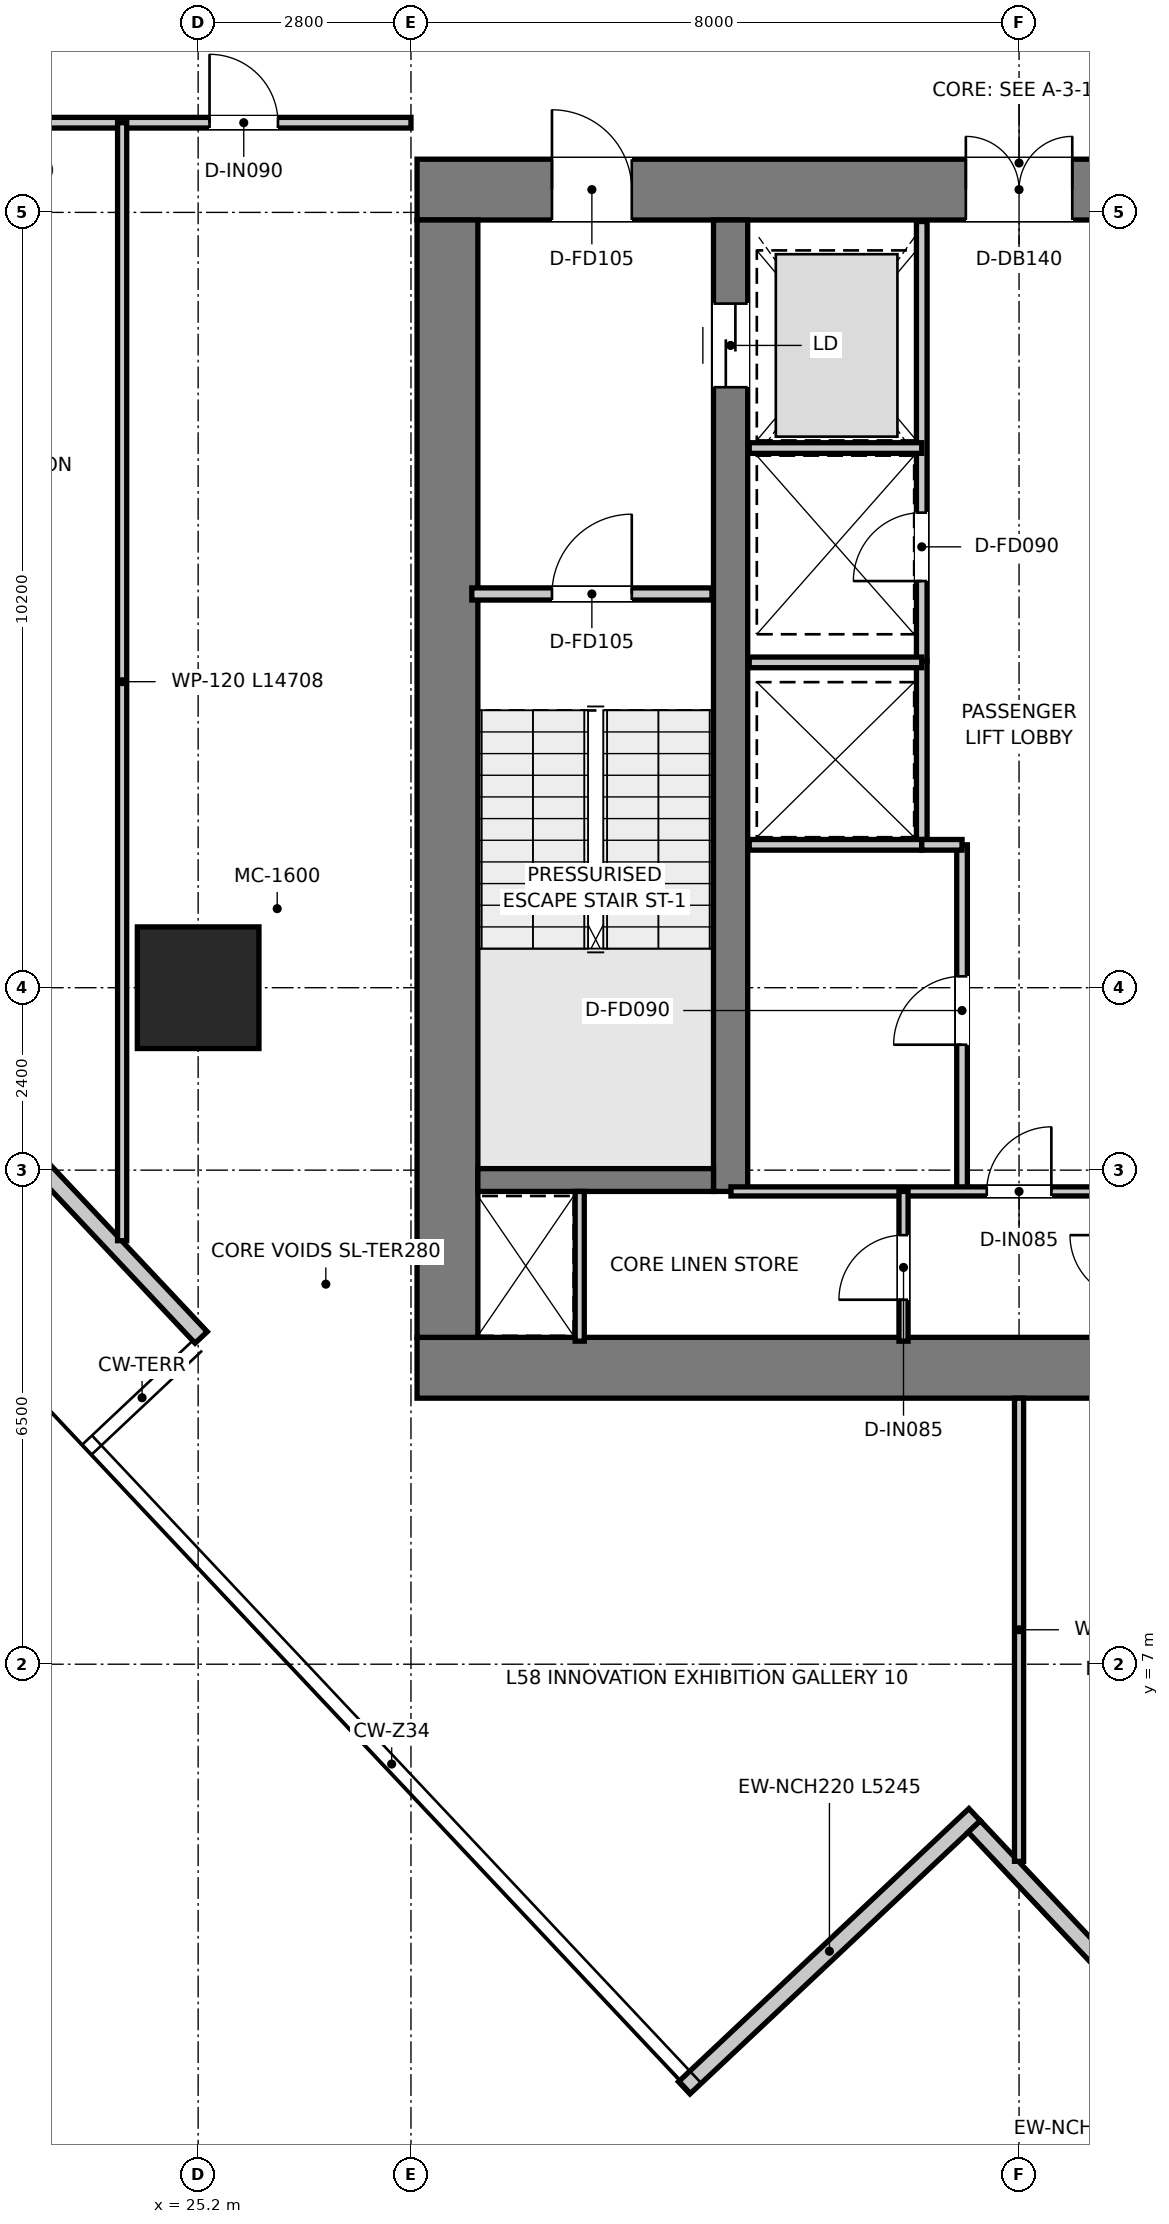
"""IFC4 building model, lengths in metres.
Left out: names, types, materials, properties, quantities, classifications, styles, units other than length and angle.
Written with IfcOpenShell. Run it as: python <this file> out.ifc"""

import sys

from ifc_helpers import new_model, si_unit, direction, frame, frame_2d, origin, origin_2d, place, context, subcontext, project, spatial, rectangle, extrude, source, transform, mapped, element, fill, save


model = new_model("IFC4")
c1 = context("Model", 3, precision=1e-05, world=origin(), true_north=direction((0.0, 1.0)))
c2 = subcontext(c1, "Body", "Model", "MODEL_VIEW")
j1 = project(units=[si_unit("LENGTHUNIT", "METRE"), si_unit("PLANEANGLEUNIT", "RADIAN")], contexts=[c1])
p1 = place(None, origin())
s1 = spatial("IfcSite", under=j1, at=p1, CompositionType="ELEMENT")
p2 = place(p1, origin())
s2 = spatial("IfcBuilding", under=s1, at=p2, CompositionType="ELEMENT")
p3 = place(p2, frame((0.0, 0.0, 238.9)))
s3 = spatial("IfcBuildingStorey", under=s2, at=p3, CompositionType="ELEMENT", Elevation=238.9)
p4 = place(p3, frame((28.08, 10.9, 0.0), z_axis=(0.0, 0.0, 1.0), x_axis=(1.0, 0.0, 0.0)))
e1 = element("IfcWall", 1, at=p4, inside=s3, PredefinedType="SHEAR", context=c2, shape_type="SweptSolid", body=[
    extrude(rectangle(XDim=15.84, YDim=0.8, at=frame_2d((7.92, 0.0))), origin(), (0.0, 0.0, 1.0), 3.95),
])
p5 = place(p3, frame((28.08, 26.4, 0.0), z_axis=(0.0, 0.0, 1.0), x_axis=(1.0, 0.0, 0.0)))
e2 = element("IfcWall", 2, at=p5, inside=s3, PredefinedType="SHEAR", context=c2, shape_type="SweptSolid", body=[
    extrude(rectangle(XDim=15.84, YDim=0.8, at=frame_2d((7.92, 0.0))), origin(), (0.0, 0.0, 1.0), 3.95),
])
p6 = place(p5, frame((7.22, 0.0, 0.0)))
e3 = element("IfcOpeningElement", 3, at=p6, cuts=e2, PredefinedType="OPENING", context=c2, shape_type="SweptSolid", body=[
    extrude(rectangle(XDim=1.4, YDim=2.2, at=frame_2d((0.7, 1.1))), frame((0.0, 0.41, 0.0), z_axis=(0.0, -1.0, 0.0), x_axis=(1.0, 0.0, 0.0)), (0.0, 0.0, 1.0), 0.82),
])
p7 = place(p5, frame((1.775, 0.0, 0.0)))
e4 = element("IfcOpeningElement", 4, at=p7, cuts=e2, PredefinedType="OPENING", context=c2, shape_type="SweptSolid", body=[
    extrude(rectangle(XDim=1.05, YDim=2.1, at=frame_2d((0.525, 1.05))), frame((0.0, 0.41, 0.0), z_axis=(0.0, -1.0, 0.0), x_axis=(1.0, 0.0, 0.0)), (0.0, 0.0, 1.0), 0.82),
])
p8 = place(p5, frame((13.015, 0.0, 0.0)))
e5 = element("IfcOpeningElement", 5, at=p8, cuts=e2, PredefinedType="OPENING", context=c2, shape_type="SweptSolid", body=[
    extrude(rectangle(XDim=1.05, YDim=2.1, at=frame_2d((0.525, 1.05))), frame((0.0, 0.41, 0.0), z_axis=(0.0, -1.0, 0.0), x_axis=(1.0, 0.0, 0.0)), (0.0, 0.0, 1.0), 0.82),
])
p9 = place(p3, frame((28.48, 11.3, 0.0), z_axis=(0.0, 0.0, 1.0), x_axis=(0.0, 1.0, 0.0)))
e6 = element("IfcWall", 6, at=p9, inside=s3, PredefinedType="SHEAR", context=c2, shape_type="SweptSolid", body=[
    extrude(rectangle(XDim=14.7, YDim=0.8, at=frame_2d((7.35, 0.0))), origin(), (0.0, 0.0, 1.0), 3.95),
])
p10 = place(p3, frame((32.205, 13.22, 0.0), z_axis=(0.0, 0.0, 1.0), x_axis=(0.0, 1.0, 0.0)))
e7 = element("IfcWall", 7, at=p10, inside=s3, PredefinedType="SHEAR", context=c2, shape_type="SweptSolid", body=[
    extrude(rectangle(XDim=12.78, YDim=0.45, at=frame_2d((6.39, 0.0))), origin(), (0.0, 0.0, 1.0), 3.95),
])
p11 = place(p10, frame((10.58, 0.0, 0.0)))
e8 = element("IfcOpeningElement", 8, at=p11, cuts=e7, PredefinedType="OPENING", context=c2, shape_type="SweptSolid", body=[
    extrude(rectangle(XDim=1.1, YDim=2.15, at=frame_2d((0.55, 1.075))), frame((0.0, 0.235, 0.0), z_axis=(0.0, -1.0, 0.0), x_axis=(1.0, 0.0, 0.0)), (0.0, 0.0, 1.0), 0.47),
])
p12 = place(p3, frame((28.88, 13.37, 0.0), z_axis=(0.0, 0.0, 1.0), x_axis=(1.0, 0.0, 0.0)))
e9 = element("IfcWall", 9, at=p12, inside=s3, PredefinedType="SHEAR", context=c2, shape_type="SweptSolid", body=[
    extrude(rectangle(XDim=3.1, YDim=0.3, at=frame_2d((1.55, 0.0))), origin(), (0.0, 0.0, 1.0), 3.95),
])
m1 = source(origin(), c2, "Body", "SweptSolid", [
    extrude(rectangle(XDim=1.6, YDim=1.6, at=origin_2d()), origin(), (0.0, 0.0, 1.0), 3.95),
])
p13 = place(p3, frame((25.2, 15.9, 0.0), z_axis=(0.0, 0.0, 1.0), x_axis=(1.0, 0.0, 0.0)))
e10 = element("IfcColumn", 10, at=p13, inside=s3, PredefinedType="USERDEFINED", context=c2, shape_type="MappedRepresentation", body=[
    mapped(m1, transform((0.0, 0.0, 0.0), x_axis=(1.0, 0.0, 0.0), y_axis=(0.0, 1.0, 0.0), z_axis=(0.0, 0.0, 1.0), scale=1.0)),
])
p14 = place(p3, frame((25.24, 11.299, 0.0), z_axis=(0.0, 0.0, 1.0), x_axis=(-0.685172559646, 0.728380781946, 0.0)))
e11 = element("IfcWall", 11, at=p14, inside=s3, PredefinedType="ELEMENTEDWALL", context=c2, shape_type="SweptSolid", body=[
    extrude(rectangle(XDim=7.69, YDim=0.22, at=frame_2d((3.845, 0.0))), origin(), (0.0, 0.0, 1.0), 3.18),
])
p15 = place(p14, frame((3.37, 0.0, 0.0)))
e12 = element("IfcOpeningElement", 12, at=p15, cuts=e11, PredefinedType="OPENING", context=c2, shape_type="SweptSolid", body=[
    extrude(rectangle(XDim=0.95, YDim=2.1, at=frame_2d((0.475, 1.05))), frame((0.0, 0.12, 0.0), z_axis=(0.0, -1.0, 0.0), x_axis=(1.0, 0.0, 0.0)), (0.0, 0.0, 1.0), 0.24),
])
p16 = place(p3, frame((31.595, 1.427, 0.0), z_axis=(0.0, 0.0, 1.0), x_axis=(0.728374884992, 0.685178828418, 0.0)))
e13 = element("IfcWall", 13, at=p16, inside=s3, PredefinedType="ELEMENTEDWALL", context=c2, shape_type="SweptSolid", body=[
    extrude(rectangle(XDim=5.245, YDim=0.22, at=frame_2d((2.623, 0.0))), origin(), (0.0, 0.0, 1.0), 3.67),
])
p17 = place(p3, frame((35.411, 4.865, 0.0), z_axis=(0.0, 0.0, 1.0), x_axis=(0.685205552999, -0.728349744381, 0.0)))
e14 = element("IfcWall", 14, at=p17, inside=s3, PredefinedType="ELEMENTEDWALL", context=c2, shape_type="SweptSolid", body=[
    extrude(rectangle(XDim=5.025, YDim=0.22, at=frame_2d((2.512, 0.0))), origin(), (0.0, 0.0, 1.0), 3.67),
])
p18 = place(p3, frame((28.8, 21.08, 0.0), z_axis=(0.0, 0.0, 1.0), x_axis=(1.0, 0.0, 0.0)))
e15 = element("IfcWall", 15, at=p18, inside=s3, PredefinedType="PARTITIONING", context=c2, shape_type="SweptSolid", body=[
    extrude(rectangle(XDim=3.16, YDim=0.16, at=frame_2d((1.58, 0.0))), origin(), (0.0, 0.0, 1.0), 3.67),
])
p19 = place(p18, frame((1.055, 0.0, 0.0)))
e16 = element("IfcOpeningElement", 16, at=p19, cuts=e15, PredefinedType="OPENING", context=c2, shape_type="SweptSolid", body=[
    extrude(rectangle(XDim=1.05, YDim=2.1, at=frame_2d((0.525, 1.05))), frame((0.0, 0.09, 0.0), z_axis=(0.0, -1.0, 0.0), x_axis=(1.0, 0.0, 0.0)), (0.0, 0.0, 1.0), 0.18),
])
p20 = place(p3, frame((34.72, 20.2, 0.0), z_axis=(0.0, 0.0, 1.0), x_axis=(0.0, 1.0, 0.0)))
e17 = element("IfcWall", 17, at=p20, inside=s3, PredefinedType="PARTITIONING", context=c2, shape_type="SweptSolid", body=[
    extrude(rectangle(XDim=5.78, YDim=0.14, at=frame_2d((2.89, 0.0))), origin(), (0.0, 0.0, 1.0), 2.67),
])
p21 = place(p20, frame((1.05, 0.0, 0.0)))
e18 = element("IfcOpeningElement", 18, at=p21, cuts=e17, PredefinedType="OPENING", context=c2, shape_type="SweptSolid", body=[
    extrude(rectangle(XDim=0.9, YDim=2.1, at=frame_2d((0.45, 1.05))), frame((0.0, 0.08, 0.0), z_axis=(0.0, -1.0, 0.0), x_axis=(1.0, 0.0, 0.0)), (0.0, 0.0, 1.0), 0.16),
])
p22 = place(p3, frame((32.45, 23.0, 0.0), z_axis=(0.0, 0.0, 1.0), x_axis=(1.0, 0.0, 0.0)))
e19 = element("IfcWall", 19, at=p22, inside=s3, PredefinedType="PARTITIONING", context=c2, shape_type="SweptSolid", body=[
    extrude(rectangle(XDim=2.27, YDim=0.14, at=frame_2d((1.135, 0.0))), origin(), (0.0, 0.0, 1.0), 2.67),
])
p23 = place(p3, frame((34.72, 17.78, 0.0), z_axis=(0.0, 0.0, 1.0), x_axis=(0.0, 1.0, 0.0)))
e20 = element("IfcWall", 20, at=p23, inside=s3, PredefinedType="PARTITIONING", context=c2, shape_type="SweptSolid", body=[
    extrude(rectangle(XDim=2.42, YDim=0.14, at=frame_2d((1.21, 0.0))), origin(), (0.0, 0.0, 1.0), 3.67),
])
for number, where, z_axis, x_axis in (
    (21, (32.45, 17.78, 0.0), (0.0, 0.0, 1.0), (1.0, 0.0, 0.0)),
    (22, (32.45, 20.18, 0.0), (0.0, 0.0, 1.0), (1.0, 0.0, 0.0)),
):
    element("IfcWall", number, at=place(p3, frame(where, z_axis=z_axis, x_axis=x_axis)), inside=s3, PredefinedType="PARTITIONING", context=c2, shape_type="SweptSolid", body=[
        extrude(rectangle(XDim=2.27, YDim=0.14, at=frame_2d((1.135, 0.0))), origin(), (0.0, 0.0, 1.0), 3.67),
    ])
p24 = place(p3, frame((35.25, 13.22, 0.0), z_axis=(0.0, 0.0, 1.0), x_axis=(0.0, 1.0, 0.0)))
e23 = element("IfcWall", 23, at=p24, inside=s3, PredefinedType="PARTITIONING", context=c2, shape_type="SweptSolid", body=[
    extrude(rectangle(XDim=4.56, YDim=0.14, at=frame_2d((2.28, 0.0))), origin(), (0.0, 0.0, 1.0), 3.67),
])
p25 = place(p24, frame((1.93, 0.0, 0.0)))
e24 = element("IfcOpeningElement", 24, at=p25, cuts=e23, PredefinedType="OPENING", context=c2, shape_type="SweptSolid", body=[
    extrude(rectangle(XDim=0.9, YDim=2.1, at=frame_2d((0.45, 1.05))), frame((0.0, 0.08, 0.0), z_axis=(0.0, -1.0, 0.0), x_axis=(1.0, 0.0, 0.0)), (0.0, 0.0, 1.0), 0.16),
])
p26 = place(p3, frame((34.72, 17.78, 0.0), z_axis=(0.0, 0.0, 1.0), x_axis=(1.0, 0.0, 0.0)))
e25 = element("IfcWall", 25, at=p26, inside=s3, PredefinedType="PARTITIONING", context=c2, shape_type="SweptSolid", body=[
    extrude(rectangle(XDim=0.53, YDim=0.14, at=frame_2d((0.265, 0.0))), origin(), (0.0, 0.0, 1.0), 3.67),
])
p27 = place(p3, frame((30.22, 11.25, 0.0), z_axis=(0.0, 0.0, 1.0), x_axis=(0.0, 1.0, 0.0)))
e26 = element("IfcWall", 26, at=p27, inside=s3, PredefinedType="PARTITIONING", context=c2, shape_type="SweptSolid", body=[
    extrude(rectangle(XDim=1.97, YDim=0.12, at=frame_2d((0.985, 0.0))), origin(), (0.0, 0.0, 1.0), 3.67),
])
p28 = place(p3, frame((32.21, 13.22, 0.0), z_axis=(0.0, 0.0, 1.0), x_axis=(1.0, 0.0, 0.0)))
e27 = element("IfcWall", 27, at=p28, inside=s3, PredefinedType="PARTITIONING", context=c2, shape_type="SweptSolid", body=[
    extrude(rectangle(XDim=7.58, YDim=0.12, at=frame_2d((3.79, 0.0))), origin(), (0.0, 0.0, 1.0), 3.67),
])
p29 = place(p28, frame((3.365, 0.0, 0.0)))
e28 = element("IfcOpeningElement", 28, at=p29, cuts=e27, PredefinedType="OPENING", context=c2, shape_type="SweptSolid", body=[
    extrude(rectangle(XDim=0.85, YDim=2.1, at=frame_2d((0.425, 1.05))), frame((0.0, 0.07, 0.0), z_axis=(0.0, -1.0, 0.0), x_axis=(1.0, 0.0, 0.0)), (0.0, 0.0, 1.0), 0.14),
])
p30 = place(p3, frame((34.48, 11.25, 0.0), z_axis=(0.0, 0.0, 1.0), x_axis=(0.0, 1.0, 0.0)))
e29 = element("IfcWall", 29, at=p30, inside=s3, PredefinedType="PARTITIONING", context=c2, shape_type="SweptSolid", body=[
    extrude(rectangle(XDim=1.97, YDim=0.12, at=frame_2d((0.985, 0.0))), origin(), (0.0, 0.0, 1.0), 3.67),
])
p31 = place(p30, frame((0.545, 0.0, 0.0)))
e30 = element("IfcOpeningElement", 30, at=p31, cuts=e29, PredefinedType="OPENING", context=c2, shape_type="SweptSolid", body=[
    extrude(rectangle(XDim=0.85, YDim=2.1, at=frame_2d((0.425, 1.05))), frame((0.0, 0.07, 0.0), z_axis=(0.0, -1.0, 0.0), x_axis=(1.0, 0.0, 0.0)), (0.0, 0.0, 1.0), 0.14),
])
p32 = place(p3, frame((14.316, 27.28, 0.0), z_axis=(0.0, 0.0, 1.0), x_axis=(1.0, 0.0, 0.0)))
e31 = element("IfcWall", 31, at=p32, inside=s3, PredefinedType="PARTITIONING", context=c2, shape_type="SweptSolid", body=[
    extrude(rectangle(XDim=13.684, YDim=0.14, at=frame_2d((6.842, 0.0))), origin(), (0.0, 0.0, 1.0), 3.03),
])
p33 = place(p32, frame((0.614, 0.0, 0.0)))
e32 = element("IfcOpeningElement", 32, at=p33, cuts=e31, PredefinedType="OPENING", context=c2, shape_type="SweptSolid", body=[
    extrude(rectangle(XDim=0.9, YDim=2.1, at=frame_2d((0.45, 1.05))), frame((0.0, 0.08, 0.0), z_axis=(0.0, -1.0, 0.0), x_axis=(1.0, 0.0, 0.0)), (0.0, 0.0, 1.0), 0.16),
])
p34 = place(p32, frame((8.034, 0.0, 0.0)))
e33 = element("IfcOpeningElement", 33, at=p34, cuts=e31, PredefinedType="OPENING", context=c2, shape_type="SweptSolid", body=[
    extrude(rectangle(XDim=0.9, YDim=2.1, at=frame_2d((0.45, 1.05))), frame((0.0, 0.08, 0.0), z_axis=(0.0, -1.0, 0.0), x_axis=(1.0, 0.0, 0.0)), (0.0, 0.0, 1.0), 0.16),
])
p35 = place(p32, frame((11.034, 0.0, 0.0)))
e34 = element("IfcOpeningElement", 34, at=p35, cuts=e31, PredefinedType="OPENING", context=c2, shape_type="SweptSolid", body=[
    extrude(rectangle(XDim=0.9, YDim=2.1, at=frame_2d((0.45, 1.05))), frame((0.0, 0.08, 0.0), z_axis=(0.0, -1.0, 0.0), x_axis=(1.0, 0.0, 0.0)), (0.0, 0.0, 1.0), 0.16),
])
p36 = place(p3, frame((36.0, 4.407, 0.0), z_axis=(0.0, 0.0, 1.0), x_axis=(0.0, 1.0, 0.0)))
e35 = element("IfcWall", 35, at=p36, inside=s3, PredefinedType="PARTITIONING", context=c2, shape_type="SweptSolid", body=[
    extrude(rectangle(XDim=6.093, YDim=0.12, at=frame_2d((3.047, 0.0))), origin(), (0.0, 0.0, 1.0), 3.67),
])
p37 = place(p3, frame((24.2, 12.572, 0.0), z_axis=(0.0, 0.0, 1.0), x_axis=(0.0, 1.0, 0.0)))
e36 = element("IfcWall", 36, at=p37, inside=s3, PredefinedType="PARTITIONING", context=c2, shape_type="SweptSolid", body=[
    extrude(rectangle(XDim=14.708, YDim=0.12, at=frame_2d((7.354, 0.0))), origin(), (0.0, 0.0, 1.0), 3.18),
])
p38 = place(p19, origin())
e37 = element("IfcDoor", 37, at=p38, inside=s3, OperationType="SINGLE_SWING_RIGHT", PredefinedType="DOOR", context=c2, shape_type="SweptSolid", body=[
    extrude(rectangle(XDim=1.05, YDim=2.1, at=frame_2d((0.525, 1.05))), frame((0.0, 0.025, 0.0), z_axis=(0.0, -1.0, 0.0), x_axis=(1.0, 0.0, 0.0)), (0.0, 0.0, 1.0), 0.05),
])
fill(e16, e37)
p39 = place(p6, origin())
e38 = element("IfcDoor", 38, at=p39, inside=s3, OperationType="DOUBLE_DOOR_SINGLE_SWING", PredefinedType="DOOR", context=c2, shape_type="SweptSolid", body=[
    extrude(rectangle(XDim=1.4, YDim=2.2, at=frame_2d((0.7, 1.1))), frame((0.0, 0.025, 0.0), z_axis=(0.0, -1.0, 0.0), x_axis=(1.0, 0.0, 0.0)), (0.0, 0.0, 1.0), 0.05),
])
fill(e3, e38)
p40 = place(p7, origin())
e39 = element("IfcDoor", 39, at=p40, inside=s3, OperationType="SINGLE_SWING_LEFT", PredefinedType="DOOR", context=c2, shape_type="SweptSolid", body=[
    extrude(rectangle(XDim=1.05, YDim=2.1, at=frame_2d((0.525, 1.05))), frame((0.0, 0.025, 0.0), z_axis=(0.0, -1.0, 0.0), x_axis=(1.0, 0.0, 0.0)), (0.0, 0.0, 1.0), 0.05),
])
fill(e4, e39)
p41 = place(p11, origin())
e40 = element("IfcDoor", 40, at=p41, inside=s3, OperationType="DOUBLE_DOOR_SLIDING", PredefinedType="DOOR", context=c2, shape_type="SweptSolid", body=[
    extrude(rectangle(XDim=1.1, YDim=2.15, at=frame_2d((0.55, 1.075))), frame((0.0, 0.025, 0.0), z_axis=(0.0, -1.0, 0.0), x_axis=(1.0, 0.0, 0.0)), (0.0, 0.0, 1.0), 0.05),
])
fill(e8, e40)
p42 = place(p21, origin())
e41 = element("IfcDoor", 41, at=p42, inside=s3, OperationType="SINGLE_SWING_LEFT", PredefinedType="DOOR", context=c2, shape_type="SweptSolid", body=[
    extrude(rectangle(XDim=0.9, YDim=2.1, at=frame_2d((0.45, 1.05))), frame((0.0, 0.025, 0.0), z_axis=(0.0, -1.0, 0.0), x_axis=(1.0, 0.0, 0.0)), (0.0, 0.0, 1.0), 0.05),
])
fill(e18, e41)
p43 = place(p25, origin())
e42 = element("IfcDoor", 42, at=p43, inside=s3, OperationType="SINGLE_SWING_LEFT", PredefinedType="DOOR", context=c2, shape_type="SweptSolid", body=[
    extrude(rectangle(XDim=0.9, YDim=2.1, at=frame_2d((0.45, 1.05))), frame((0.0, 0.025, 0.0), z_axis=(0.0, -1.0, 0.0), x_axis=(1.0, 0.0, 0.0)), (0.0, 0.0, 1.0), 0.05),
])
fill(e24, e42)
p44 = place(p29, origin())
e43 = element("IfcDoor", 43, at=p44, inside=s3, OperationType="SINGLE_SWING_RIGHT", PredefinedType="DOOR", context=c2, shape_type="SweptSolid", body=[
    extrude(rectangle(XDim=0.85, YDim=2.1, at=frame_2d((0.425, 1.05))), frame((0.0, 0.025, 0.0), z_axis=(0.0, -1.0, 0.0), x_axis=(1.0, 0.0, 0.0)), (0.0, 0.0, 1.0), 0.05),
])
fill(e28, e43)
p45 = place(p31, origin())
e44 = element("IfcDoor", 44, at=p45, inside=s3, OperationType="SINGLE_SWING_LEFT", PredefinedType="DOOR", context=c2, shape_type="SweptSolid", body=[
    extrude(rectangle(XDim=0.85, YDim=2.1, at=frame_2d((0.425, 1.05))), frame((0.0, 0.025, 0.0), z_axis=(0.0, -1.0, 0.0), x_axis=(1.0, 0.0, 0.0)), (0.0, 0.0, 1.0), 0.05),
])
fill(e30, e44)
p46 = place(p35, origin())
e45 = element("IfcDoor", 45, at=p46, inside=s3, OperationType="SINGLE_SWING_LEFT", PredefinedType="DOOR", context=c2, shape_type="SweptSolid", body=[
    extrude(rectangle(XDim=0.9, YDim=2.1, at=frame_2d((0.45, 1.05))), frame((0.0, 0.025, 0.0), z_axis=(0.0, -1.0, 0.0), x_axis=(1.0, 0.0, 0.0)), (0.0, 0.0, 1.0), 0.05),
])
fill(e34, e45)
save(model, sys.argv[1])
